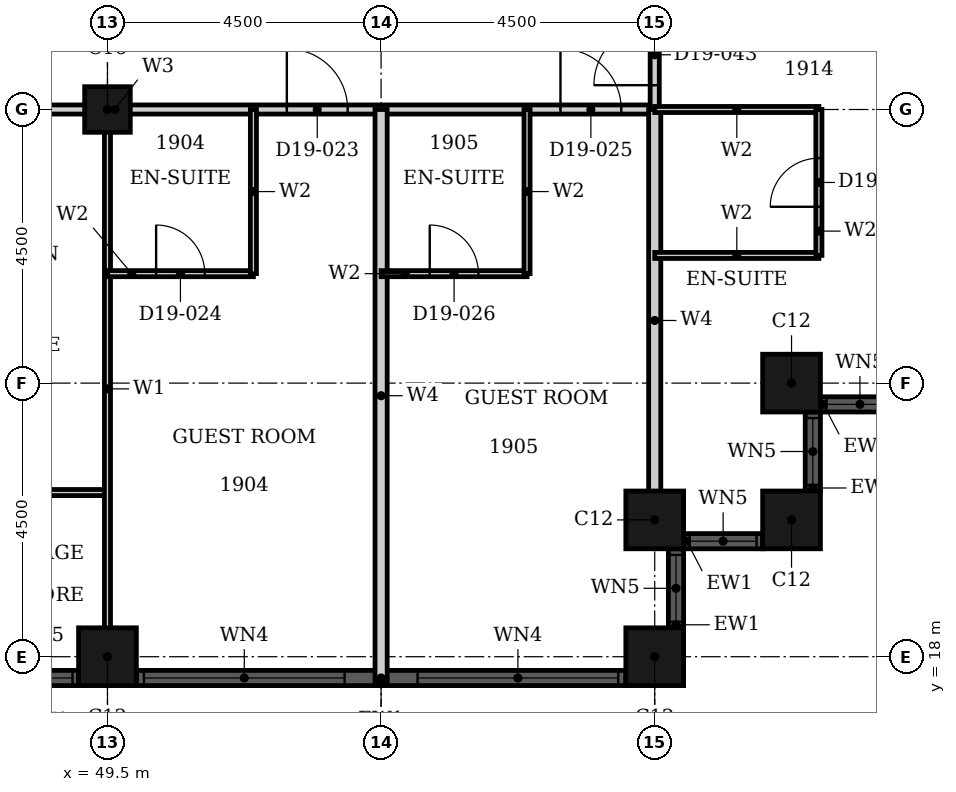
"""IFC4 building model, lengths in metres.
Left out: names, types, materials, properties, quantities, classifications, styles, units other than length and angle.
Written with IfcOpenShell. Run it as: python <this file> out.ifc"""

import sys

from ifc_helpers import new_model, si_unit, direction, frame, frame_2d, origin, origin_2d, place, context, subcontext, project, spatial, rectangle, hollow_rectangle, extrude, element, fill, save


model = new_model("IFC4")
c1 = context("Model", 3, precision=1e-05, world=origin(), true_north=direction((0.0, 1.0)))
c2 = subcontext(c1, "Body", "Model", "MODEL_VIEW")
j1 = project(units=[si_unit("LENGTHUNIT", "METRE"), si_unit("PLANEANGLEUNIT", "RADIAN")], contexts=[c1])
p1 = place(None, origin())
s1 = spatial("IfcSite", under=j1, at=p1, CompositionType="ELEMENT")
p2 = place(p1, origin())
s2 = spatial("IfcBuilding", under=s1, at=p2, CompositionType="ELEMENT")
p3 = place(p2, frame((0.0, 0.0, 81.6)))
s3 = spatial("IfcBuildingStorey", under=s2, at=p3, CompositionType="ELEMENT", Elevation=81.6)
for number, where, z_axis, x_axis in (
    (1, (49.5, 18.0, 0.0), (0.0, 0.0, 1.0), (1.0, 0.0, 0.0)),
    (2, (58.5, 18.0, 0.0), (0.0, 0.0, 1.0), (1.0, 0.0, 0.0)),
    (3, (58.5, 20.25, 0.0), (0.0, 0.0, 1.0), (1.0, 0.0, 0.0)),
    (4, (60.75, 20.25, 0.0), (0.0, 0.0, 1.0), (1.0, 0.0, 0.0)),
    (5, (60.75, 22.5, 0.0), (0.0, 0.0, 1.0), (1.0, 0.0, 0.0)),
):
    element("IfcColumn", number, at=place(p3, frame(where, z_axis=z_axis, x_axis=x_axis)), inside=s3, PredefinedType="COLUMN", context=c2, shape_type="SweptSolid", body=[
        extrude(hollow_rectangle(XDim=0.95, YDim=0.95, WallThickness=0.03, at=origin_2d()), origin(), (0.0, 0.0, 1.0), 3.6),
    ])
p4 = place(p3, frame((49.5, 27.0, 0.0), z_axis=(0.0, 0.0, 1.0), x_axis=(1.0, 0.0, 0.0)))
e6 = element("IfcColumn", 6, at=p4, inside=s3, PredefinedType="COLUMN", context=c2, shape_type="SweptSolid", body=[
    extrude(hollow_rectangle(XDim=0.75, YDim=0.75, WallThickness=0.024, at=origin_2d()), origin(), (0.0, 0.0, 1.0), 3.6),
])
p5 = place(p3, frame((47.725, 17.65, 0.0), z_axis=(0.0, 0.0, 1.0), x_axis=(1.0, 0.0, 0.0)))
e7 = element("IfcWall", 7, at=p5, inside=s3, PredefinedType="SOLIDWALL", context=c2, shape_type="SweptSolid", body=[
    extrude(rectangle(XDim=1.3, YDim=0.25, at=frame_2d((0.65, 0.0))), origin(), (0.0, 0.0, 1.0), 3.6),
])
p6 = place(p5, frame((0.1, 0.0, 0.9)))
e8 = element("IfcOpeningElement", 8, at=p6, cuts=e7, PredefinedType="OPENING", context=c2, shape_type="SweptSolid", body=[
    extrude(rectangle(XDim=1.1, YDim=2.08, at=frame_2d((0.55, 1.04))), frame((0.0, 0.135, 0.0), z_axis=(0.0, -1.0, 0.0), x_axis=(1.0, 0.0, 0.0)), (0.0, 0.0, 1.0), 0.27),
])
p7 = place(p3, frame((49.975, 17.65, 0.0), z_axis=(0.0, 0.0, 1.0), x_axis=(1.0, 0.0, 0.0)))
e9 = element("IfcWall", 9, at=p7, inside=s3, PredefinedType="SOLIDWALL", context=c2, shape_type="SweptSolid", body=[
    extrude(rectangle(XDim=8.05, YDim=0.25, at=frame_2d((4.025, 0.0))), origin(), (0.0, 0.0, 1.0), 3.6),
])
p8 = place(p7, frame((0.125, 0.0, 0.9)))
e10 = element("IfcOpeningElement", 10, at=p8, cuts=e9, PredefinedType="OPENING", context=c2, shape_type="SweptSolid", body=[
    extrude(rectangle(XDim=3.3, YDim=2.08, at=frame_2d((1.65, 1.04))), frame((0.0, 0.135, 0.0), z_axis=(0.0, -1.0, 0.0), x_axis=(1.0, 0.0, 0.0)), (0.0, 0.0, 1.0), 0.27),
])
p9 = place(p7, frame((4.625, 0.0, 0.9)))
e11 = element("IfcOpeningElement", 11, at=p9, cuts=e9, PredefinedType="OPENING", context=c2, shape_type="SweptSolid", body=[
    extrude(rectangle(XDim=3.3, YDim=2.08, at=frame_2d((1.65, 1.04))), frame((0.0, 0.135, 0.0), z_axis=(0.0, -1.0, 0.0), x_axis=(1.0, 0.0, 0.0)), (0.0, 0.0, 1.0), 0.27),
])
p10 = place(p3, frame((58.85, 18.475, 0.0), z_axis=(0.0, 0.0, 1.0), x_axis=(0.0, 1.0, 0.0)))
e12 = element("IfcWall", 12, at=p10, inside=s3, PredefinedType="SOLIDWALL", context=c2, shape_type="SweptSolid", body=[
    extrude(rectangle(XDim=1.3, YDim=0.25, at=frame_2d((0.65, 0.0))), origin(), (0.0, 0.0, 1.0), 3.6),
])
p11 = place(p10, frame((0.1, 0.0, 0.9)))
e13 = element("IfcOpeningElement", 13, at=p11, cuts=e12, PredefinedType="OPENING", context=c2, shape_type="SweptSolid", body=[
    extrude(rectangle(XDim=1.1, YDim=2.08, at=frame_2d((0.55, 1.04))), frame((0.0, 0.135, 0.0), z_axis=(0.0, -1.0, 0.0), x_axis=(1.0, 0.0, 0.0)), (0.0, 0.0, 1.0), 0.27),
])
p12 = place(p3, frame((58.975, 19.9, 0.0), z_axis=(0.0, 0.0, 1.0), x_axis=(1.0, 0.0, 0.0)))
e14 = element("IfcWall", 14, at=p12, inside=s3, PredefinedType="SOLIDWALL", context=c2, shape_type="SweptSolid", body=[
    extrude(rectangle(XDim=1.3, YDim=0.25, at=frame_2d((0.65, 0.0))), origin(), (0.0, 0.0, 1.0), 3.6),
])
p13 = place(p12, frame((0.1, 0.0, 0.9)))
e15 = element("IfcOpeningElement", 15, at=p13, cuts=e14, PredefinedType="OPENING", context=c2, shape_type="SweptSolid", body=[
    extrude(rectangle(XDim=1.1, YDim=2.08, at=frame_2d((0.55, 1.04))), frame((0.0, 0.135, 0.0), z_axis=(0.0, -1.0, 0.0), x_axis=(1.0, 0.0, 0.0)), (0.0, 0.0, 1.0), 0.27),
])
p14 = place(p3, frame((61.1, 20.725, 0.0), z_axis=(0.0, 0.0, 1.0), x_axis=(0.0, 1.0, 0.0)))
e16 = element("IfcWall", 16, at=p14, inside=s3, PredefinedType="SOLIDWALL", context=c2, shape_type="SweptSolid", body=[
    extrude(rectangle(XDim=1.3, YDim=0.25, at=frame_2d((0.65, 0.0))), origin(), (0.0, 0.0, 1.0), 3.6),
])
p15 = place(p14, frame((0.1, 0.0, 0.9)))
e17 = element("IfcOpeningElement", 17, at=p15, cuts=e16, PredefinedType="OPENING", context=c2, shape_type="SweptSolid", body=[
    extrude(rectangle(XDim=1.1, YDim=2.08, at=frame_2d((0.55, 1.04))), frame((0.0, 0.135, 0.0), z_axis=(0.0, -1.0, 0.0), x_axis=(1.0, 0.0, 0.0)), (0.0, 0.0, 1.0), 0.27),
])
p16 = place(p3, frame((61.225, 22.15, 0.0), z_axis=(0.0, 0.0, 1.0), x_axis=(1.0, 0.0, 0.0)))
e18 = element("IfcWall", 18, at=p16, inside=s3, PredefinedType="SOLIDWALL", context=c2, shape_type="SweptSolid", body=[
    extrude(rectangle(XDim=1.3, YDim=0.25, at=frame_2d((0.65, 0.0))), origin(), (0.0, 0.0, 1.0), 3.6),
])
p17 = place(p16, frame((0.1, 0.0, 0.9)))
e19 = element("IfcOpeningElement", 19, at=p17, cuts=e18, PredefinedType="OPENING", context=c2, shape_type="SweptSolid", body=[
    extrude(rectangle(XDim=1.1, YDim=2.08, at=frame_2d((0.55, 1.04))), frame((0.0, 0.135, 0.0), z_axis=(0.0, -1.0, 0.0), x_axis=(1.0, 0.0, 0.0)), (0.0, 0.0, 1.0), 0.27),
])
p18 = place(p3, frame((46.8, 27.0, 0.0), z_axis=(0.0, 0.0, 1.0), x_axis=(1.0, 0.0, 0.0)))
e20 = element("IfcWall", 20, at=p18, inside=s3, PredefinedType="PARTITIONING", context=c2, shape_type="SweptSolid", body=[
    extrude(rectangle(XDim=11.7, YDim=0.15, at=frame_2d((5.85, 0.0))), origin(), (0.0, 0.0, 1.0), 2.58),
])
p19 = place(p18, frame((5.65, 0.0, 0.0)))
e21 = element("IfcOpeningElement", 21, at=p19, cuts=e20, PredefinedType="OPENING", context=c2, shape_type="SweptSolid", body=[
    extrude(rectangle(XDim=1.0, YDim=2.1, at=frame_2d((0.5, 1.05))), frame((0.0, 0.085, 0.0), z_axis=(0.0, -1.0, 0.0), x_axis=(1.0, 0.0, 0.0)), (0.0, 0.0, 1.0), 0.17),
])
p20 = place(p18, frame((10.15, 0.0, 0.0)))
e22 = element("IfcOpeningElement", 22, at=p20, cuts=e20, PredefinedType="OPENING", context=c2, shape_type="SweptSolid", body=[
    extrude(rectangle(XDim=1.0, YDim=2.1, at=frame_2d((0.5, 1.05))), frame((0.0, 0.085, 0.0), z_axis=(0.0, -1.0, 0.0), x_axis=(1.0, 0.0, 0.0)), (0.0, 0.0, 1.0), 0.17),
])
p21 = place(p3, frame((58.5, 27.0, 0.0), z_axis=(0.0, 0.0, 1.0), x_axis=(0.0, 1.0, 0.0)))
e23 = element("IfcWall", 23, at=p21, inside=s3, PredefinedType="PARTITIONING", context=c2, shape_type="SweptSolid", body=[
    extrude(rectangle(XDim=1.8, YDim=0.15, at=frame_2d((0.9, 0.0))), origin(), (0.0, 0.0, 1.0), 3.3),
])
p22 = place(p21, frame((0.4, 0.0, 0.0)))
e24 = element("IfcOpeningElement", 24, at=p22, cuts=e23, PredefinedType="OPENING", context=c2, shape_type="SweptSolid", body=[
    extrude(rectangle(XDim=1.0, YDim=2.1, at=frame_2d((0.5, 1.05))), frame((0.0, 0.085, 0.0), z_axis=(0.0, -1.0, 0.0), x_axis=(1.0, 0.0, 0.0)), (0.0, 0.0, 1.0), 0.17),
])
p23 = place(p3, frame((46.8, 20.7, 0.0), z_axis=(0.0, 0.0, 1.0), x_axis=(1.0, 0.0, 0.0)))
e25 = element("IfcWall", 25, at=p23, inside=s3, PredefinedType="PARTITIONING", context=c2, shape_type="SweptSolid", body=[
    extrude(rectangle(XDim=2.7, YDim=0.1, at=frame_2d((1.35, 0.0))), origin(), (0.0, 0.0, 1.0), 3.3),
])
p24 = place(p3, frame((49.5, 17.81, 0.0), z_axis=(0.0, 0.0, 1.0), x_axis=(0.0, 1.0, 0.0)))
e26 = element("IfcWall", 26, at=p24, inside=s3, PredefinedType="PARTITIONING", context=c2, shape_type="SweptSolid", body=[
    extrude(rectangle(XDim=9.19, YDim=0.1, at=frame_2d((4.595, 0.0))), origin(), (0.0, 0.0, 1.0), 2.38),
])
p25 = place(p3, frame((54.0, 17.585, 0.0), z_axis=(0.0, 0.0, 1.0), x_axis=(0.0, 1.0, 0.0)))
e27 = element("IfcWall", 27, at=p25, inside=s3, PredefinedType="PARTITIONING", context=c2, shape_type="SweptSolid", body=[
    extrude(rectangle(XDim=9.415, YDim=0.2, at=frame_2d((4.708, 0.0))), origin(), (0.0, 0.0, 1.0), 3.3),
])
p26 = place(p3, frame((58.5, 20.06, 0.0), z_axis=(0.0, 0.0, 1.0), x_axis=(0.0, 1.0, 0.0)))
e28 = element("IfcWall", 28, at=p26, inside=s3, PredefinedType="PARTITIONING", context=c2, shape_type="SweptSolid", body=[
    extrude(rectangle(XDim=6.94, YDim=0.2, at=frame_2d((3.47, 0.0))), origin(), (0.0, 0.0, 1.0), 3.3),
])
p27 = place(p3, frame((49.5, 24.3, 0.0), z_axis=(0.0, 0.0, 1.0), x_axis=(1.0, 0.0, 0.0)))
e29 = element("IfcWall", 29, at=p27, inside=s3, PredefinedType="PARTITIONING", context=c2, shape_type="SweptSolid", body=[
    extrude(rectangle(XDim=2.4, YDim=0.1, at=frame_2d((1.2, 0.0))), origin(), (0.0, 0.0, 1.0), 3.3),
])
p28 = place(p27, frame((0.8, 0.0, 0.0)))
e30 = element("IfcOpeningElement", 30, at=p28, cuts=e29, PredefinedType="OPENING", context=c2, shape_type="SweptSolid", body=[
    extrude(rectangle(XDim=0.8, YDim=2.1, at=frame_2d((0.4, 1.05))), frame((0.0, 0.06, 0.0), z_axis=(0.0, -1.0, 0.0), x_axis=(1.0, 0.0, 0.0)), (0.0, 0.0, 1.0), 0.12),
])
p29 = place(p3, frame((54.0, 24.3, 0.0), z_axis=(0.0, 0.0, 1.0), x_axis=(1.0, 0.0, 0.0)))
e31 = element("IfcWall", 31, at=p29, inside=s3, PredefinedType="PARTITIONING", context=c2, shape_type="SweptSolid", body=[
    extrude(rectangle(XDim=2.4, YDim=0.1, at=frame_2d((1.2, 0.0))), origin(), (0.0, 0.0, 1.0), 3.3),
])
p30 = place(p29, frame((0.8, 0.0, 0.0)))
e32 = element("IfcOpeningElement", 32, at=p30, cuts=e31, PredefinedType="OPENING", context=c2, shape_type="SweptSolid", body=[
    extrude(rectangle(XDim=0.8, YDim=2.1, at=frame_2d((0.4, 1.05))), frame((0.0, 0.06, 0.0), z_axis=(0.0, -1.0, 0.0), x_axis=(1.0, 0.0, 0.0)), (0.0, 0.0, 1.0), 0.12),
])
p31 = place(p3, frame((58.5, 24.6, 0.0), z_axis=(0.0, 0.0, 1.0), x_axis=(1.0, 0.0, 0.0)))
e33 = element("IfcWall", 33, at=p31, inside=s3, PredefinedType="PARTITIONING", context=c2, shape_type="SweptSolid", body=[
    extrude(rectangle(XDim=2.7, YDim=0.1, at=frame_2d((1.35, 0.0))), origin(), (0.0, 0.0, 1.0), 3.3),
])
p32 = place(p3, frame((58.5, 27.0, 0.0), z_axis=(0.0, 0.0, 1.0), x_axis=(1.0, 0.0, 0.0)))
e34 = element("IfcWall", 34, at=p32, inside=s3, PredefinedType="PARTITIONING", context=c2, shape_type="SweptSolid", body=[
    extrude(rectangle(XDim=2.7, YDim=0.1, at=frame_2d((1.35, 0.0))), origin(), (0.0, 0.0, 1.0), 2.58),
])
for number, where, z_axis, x_axis in (
    (35, (51.9, 24.3, 0.0), (0.0, 0.0, 1.0), (0.0, 1.0, 0.0)),
    (36, (56.4, 24.3, 0.0), (0.0, 0.0, 1.0), (0.0, 1.0, 0.0)),
):
    element("IfcWall", number, at=place(p3, frame(where, z_axis=z_axis, x_axis=x_axis)), inside=s3, PredefinedType="PARTITIONING", context=c2, shape_type="SweptSolid", body=[
        extrude(rectangle(XDim=2.7, YDim=0.1, at=frame_2d((1.35, 0.0))), origin(), (0.0, 0.0, 1.0), 3.3),
    ])
p33 = place(p3, frame((61.2, 24.6, 0.0), z_axis=(0.0, 0.0, 1.0), x_axis=(0.0, 1.0, 0.0)))
e37 = element("IfcWall", 37, at=p33, inside=s3, PredefinedType="PARTITIONING", context=c2, shape_type="SweptSolid", body=[
    extrude(rectangle(XDim=2.4, YDim=0.1, at=frame_2d((1.2, 0.0))), origin(), (0.0, 0.0, 1.0), 3.3),
])
p34 = place(p33, frame((0.8, 0.0, 0.0)))
e38 = element("IfcOpeningElement", 38, at=p34, cuts=e37, PredefinedType="OPENING", context=c2, shape_type="SweptSolid", body=[
    extrude(rectangle(XDim=0.8, YDim=2.1, at=frame_2d((0.4, 1.05))), frame((0.0, 0.06, 0.0), z_axis=(0.0, -1.0, 0.0), x_axis=(1.0, 0.0, 0.0)), (0.0, 0.0, 1.0), 0.12),
])
p35 = place(p6, origin())
e39 = element("IfcWindow", 39, at=p35, inside=s3, PartitioningType="SINGLE_PANEL", PredefinedType="WINDOW", context=c2, shape_type="SweptSolid", body=[
    extrude(rectangle(XDim=1.1, YDim=2.08, at=frame_2d((0.55, 1.04))), frame((0.0, 0.03, 0.0), z_axis=(0.0, -1.0, 0.0), x_axis=(1.0, 0.0, 0.0)), (0.0, 0.0, 1.0), 0.06),
])
fill(e8, e39)
p36 = place(p8, origin())
e40 = element("IfcWindow", 40, at=p36, inside=s3, PartitioningType="SINGLE_PANEL", PredefinedType="WINDOW", context=c2, shape_type="SweptSolid", body=[
    extrude(rectangle(XDim=3.3, YDim=2.08, at=frame_2d((1.65, 1.04))), frame((0.0, 0.03, 0.0), z_axis=(0.0, -1.0, 0.0), x_axis=(1.0, 0.0, 0.0)), (0.0, 0.0, 1.0), 0.06),
])
fill(e10, e40)
p37 = place(p9, origin())
e41 = element("IfcWindow", 41, at=p37, inside=s3, PartitioningType="SINGLE_PANEL", PredefinedType="WINDOW", context=c2, shape_type="SweptSolid", body=[
    extrude(rectangle(XDim=3.3, YDim=2.08, at=frame_2d((1.65, 1.04))), frame((0.0, 0.03, 0.0), z_axis=(0.0, -1.0, 0.0), x_axis=(1.0, 0.0, 0.0)), (0.0, 0.0, 1.0), 0.06),
])
fill(e11, e41)
p38 = place(p11, origin())
e42 = element("IfcWindow", 42, at=p38, inside=s3, PartitioningType="SINGLE_PANEL", PredefinedType="WINDOW", context=c2, shape_type="SweptSolid", body=[
    extrude(rectangle(XDim=1.1, YDim=2.08, at=frame_2d((0.55, 1.04))), frame((0.0, 0.03, 0.0), z_axis=(0.0, -1.0, 0.0), x_axis=(1.0, 0.0, 0.0)), (0.0, 0.0, 1.0), 0.06),
])
fill(e13, e42)
p39 = place(p13, origin())
e43 = element("IfcWindow", 43, at=p39, inside=s3, PartitioningType="SINGLE_PANEL", PredefinedType="WINDOW", context=c2, shape_type="SweptSolid", body=[
    extrude(rectangle(XDim=1.1, YDim=2.08, at=frame_2d((0.55, 1.04))), frame((0.0, 0.03, 0.0), z_axis=(0.0, -1.0, 0.0), x_axis=(1.0, 0.0, 0.0)), (0.0, 0.0, 1.0), 0.06),
])
fill(e15, e43)
p40 = place(p15, origin())
e44 = element("IfcWindow", 44, at=p40, inside=s3, PartitioningType="SINGLE_PANEL", PredefinedType="WINDOW", context=c2, shape_type="SweptSolid", body=[
    extrude(rectangle(XDim=1.1, YDim=2.08, at=frame_2d((0.55, 1.04))), frame((0.0, 0.03, 0.0), z_axis=(0.0, -1.0, 0.0), x_axis=(1.0, 0.0, 0.0)), (0.0, 0.0, 1.0), 0.06),
])
fill(e17, e44)
p41 = place(p17, origin())
e45 = element("IfcWindow", 45, at=p41, inside=s3, PartitioningType="SINGLE_PANEL", PredefinedType="WINDOW", context=c2, shape_type="SweptSolid", body=[
    extrude(rectangle(XDim=1.1, YDim=2.08, at=frame_2d((0.55, 1.04))), frame((0.0, 0.03, 0.0), z_axis=(0.0, -1.0, 0.0), x_axis=(1.0, 0.0, 0.0)), (0.0, 0.0, 1.0), 0.06),
])
fill(e19, e45)
p42 = place(p19, origin())
e46 = element("IfcDoor", 46, at=p42, inside=s3, OperationType="SINGLE_SWING_RIGHT", PredefinedType="DOOR", context=c2, shape_type="SweptSolid", body=[
    extrude(rectangle(XDim=1.0, YDim=2.1, at=frame_2d((0.5, 1.05))), frame((0.0, 0.025, 0.0), z_axis=(0.0, -1.0, 0.0), x_axis=(1.0, 0.0, 0.0)), (0.0, 0.0, 1.0), 0.05),
])
fill(e21, e46)
p43 = place(p28, origin())
e47 = element("IfcDoor", 47, at=p43, inside=s3, OperationType="SINGLE_SWING_RIGHT", PredefinedType="DOOR", context=c2, shape_type="SweptSolid", body=[
    extrude(rectangle(XDim=0.8, YDim=2.1, at=frame_2d((0.4, 1.05))), frame((0.0, 0.025, 0.0), z_axis=(0.0, -1.0, 0.0), x_axis=(1.0, 0.0, 0.0)), (0.0, 0.0, 1.0), 0.05),
])
fill(e30, e47)
p44 = place(p20, origin())
e48 = element("IfcDoor", 48, at=p44, inside=s3, OperationType="SINGLE_SWING_RIGHT", PredefinedType="DOOR", context=c2, shape_type="SweptSolid", body=[
    extrude(rectangle(XDim=1.0, YDim=2.1, at=frame_2d((0.5, 1.05))), frame((0.0, 0.025, 0.0), z_axis=(0.0, -1.0, 0.0), x_axis=(1.0, 0.0, 0.0)), (0.0, 0.0, 1.0), 0.05),
])
fill(e22, e48)
p45 = place(p30, origin())
e49 = element("IfcDoor", 49, at=p45, inside=s3, OperationType="SINGLE_SWING_LEFT", PredefinedType="DOOR", context=c2, shape_type="SweptSolid", body=[
    extrude(rectangle(XDim=0.8, YDim=2.1, at=frame_2d((0.4, 1.05))), frame((0.0, 0.025, 0.0), z_axis=(0.0, -1.0, 0.0), x_axis=(1.0, 0.0, 0.0)), (0.0, 0.0, 1.0), 0.05),
])
fill(e32, e49)
p46 = place(p22, origin())
e50 = element("IfcDoor", 50, at=p46, inside=s3, OperationType="SINGLE_SWING_RIGHT", PredefinedType="DOOR", context=c2, shape_type="SweptSolid", body=[
    extrude(rectangle(XDim=1.0, YDim=2.1, at=frame_2d((0.5, 1.05))), frame((0.0, 0.025, 0.0), z_axis=(0.0, -1.0, 0.0), x_axis=(1.0, 0.0, 0.0)), (0.0, 0.0, 1.0), 0.05),
])
fill(e24, e50)
p47 = place(p34, origin())
e51 = element("IfcDoor", 51, at=p47, inside=s3, OperationType="SINGLE_SWING_RIGHT", PredefinedType="DOOR", context=c2, shape_type="SweptSolid", body=[
    extrude(rectangle(XDim=0.8, YDim=2.1, at=frame_2d((0.4, 1.05))), frame((0.0, 0.025, 0.0), z_axis=(0.0, -1.0, 0.0), x_axis=(1.0, 0.0, 0.0)), (0.0, 0.0, 1.0), 0.05),
])
fill(e38, e51)
save(model, sys.argv[1])
